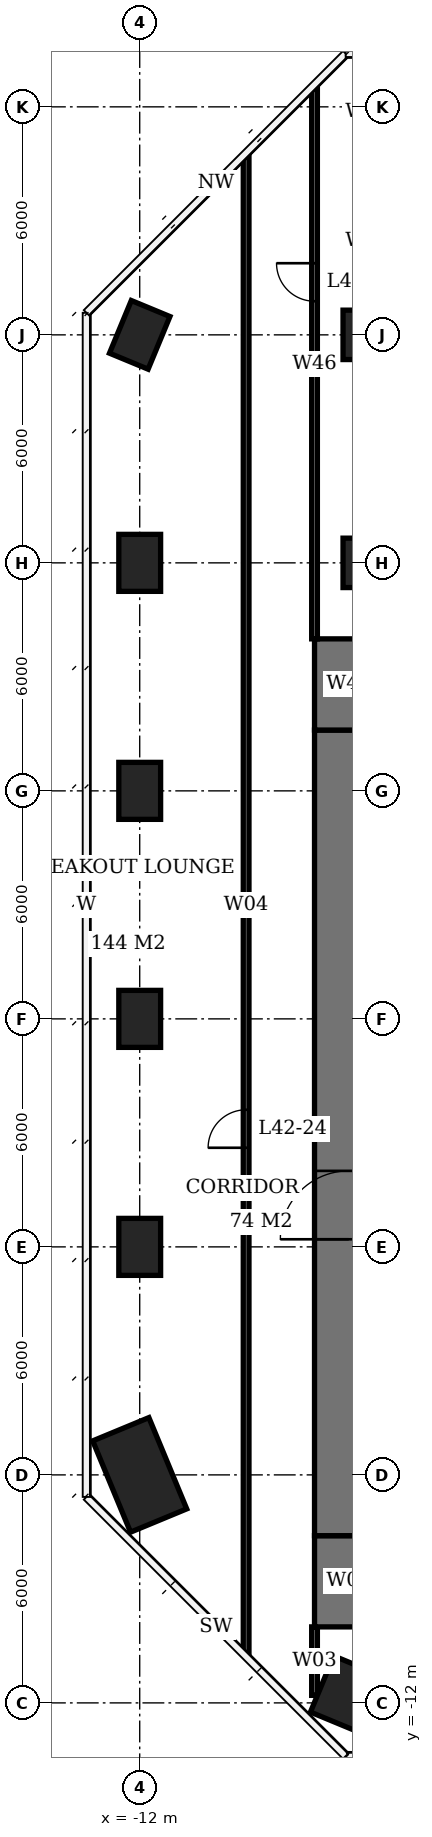
"""IFC4 building model, lengths in metres.
Left out: names, types, materials, properties, quantities, classifications, styles, units other than length and angle.
Written with IfcOpenShell. Run it as: python <this file> out.ifc"""

import sys

from ifc_helpers import new_model, si_unit, direction, frame, frame_2d, origin, origin_2d, place, context, subcontext, project, spatial, rectangle, extrude, element, fill, save


model = new_model("IFC4")
c1 = context("Model", 3, precision=1e-05, world=origin(), true_north=direction((0.0, 1.0)))
c2 = subcontext(c1, "Body", "Model", "MODEL_VIEW")
j1 = project(units=[si_unit("LENGTHUNIT", "METRE"), si_unit("PLANEANGLEUNIT", "RADIAN")], contexts=[c1])
p1 = place(None, origin())
s1 = spatial("IfcSite", under=j1, at=p1, CompositionType="ELEMENT")
p2 = place(p1, origin())
s2 = spatial("IfcBuilding", under=s1, at=p2, CompositionType="ELEMENT")
p3 = place(p2, frame((0.0, 0.0, 173.3)))
s3 = spatial("IfcBuildingStorey", under=s2, at=p3, CompositionType="ELEMENT", Elevation=173.3)
p4 = place(p3, frame((-12.0, -6.0, 0.0), z_axis=(0.0, 0.0, 1.0), x_axis=(-0.382683432365, 0.923879532511, 0.0)))
e1 = element("IfcColumn", 1, at=p4, inside=s3, PredefinedType="COLUMN", context=c2, shape_type="SweptSolid", body=[
    extrude(rectangle(XDim=2.6, YDim=1.6, at=origin_2d()), origin(), (0.0, 0.0, 1.0), 3.9),
])
for number, where, z_axis, x_axis in (
    (2, (-12.0, 0.0, 0.0), (0.0, 0.0, 1.0), (0.0, 1.0, 0.0)),
    (3, (-12.0, 6.0, 0.0), (0.0, 0.0, 1.0), (0.0, 1.0, 0.0)),
    (4, (-12.0, 12.0, 0.0), (0.0, 0.0, 1.0), (0.0, 1.0, 0.0)),
    (5, (-12.0, 18.0, 0.0), (0.0, 0.0, 1.0), (0.0, 1.0, 0.0)),
    (6, (-12.0, 24.0, 0.0), (0.0, 0.0, 1.0), (0.383, 0.924, 0.0)),
):
    element("IfcColumn", number, at=place(p3, frame(where, z_axis=z_axis, x_axis=x_axis)), inside=s3, PredefinedType="COLUMN", context=c2, shape_type="SweptSolid", body=[
        extrude(rectangle(XDim=1.5, YDim=1.1, at=origin_2d()), origin(), (0.0, 0.0, 1.0), 3.9),
    ])
p5 = place(p3, frame((-6.0, -12.0, 0.0), z_axis=(0.0, 0.0, 1.0), x_axis=(-0.923879532511, 0.382683432365, 0.0)))
e7 = element("IfcColumn", 7, at=p5, inside=s3, PredefinedType="COLUMN", context=c2, shape_type="SweptSolid", body=[
    extrude(rectangle(XDim=2.6, YDim=1.6, at=origin_2d()), origin(), (0.0, 0.0, 1.0), 3.9),
])
for number, where, z_axis, x_axis in (
    (8, (-6.0, 18.0, 0.0), (0.0, 0.0, 1.0), (1.0, 0.0, 0.0)),
    (9, (-6.0, 24.0, 0.0), (0.0, 0.0, 1.0), (1.0, 0.0, 0.0)),
):
    element("IfcColumn", number, at=place(p3, frame(where, z_axis=z_axis, x_axis=x_axis)), inside=s3, PredefinedType="COLUMN", context=c2, shape_type="SweptSolid", body=[
        extrude(rectangle(XDim=1.3, YDim=1.3, at=origin_2d()), origin(), (0.0, 0.0, 1.0), 3.9),
    ])
p6 = place(p3, frame((-6.5, -7.6, 0.0), z_axis=(0.0, 0.0, 1.0), x_axis=(0.0, 1.0, 0.0)))
e10 = element("IfcWall", 10, at=p6, inside=s3, PredefinedType="SHEAR", context=c2, shape_type="SweptSolid", body=[
    extrude(rectangle(XDim=21.2, YDim=1.8, at=frame_2d((10.6, 0.0))), origin(), (0.0, 0.0, 1.0), 3.9),
])
p7 = place(p6, frame((7.8, 0.0, 0.0)))
e11 = element("IfcOpeningElement", 11, at=p7, cuts=e10, PredefinedType="OPENING", context=c2, shape_type="SweptSolid", body=[
    extrude(rectangle(XDim=1.8, YDim=2.4, at=frame_2d((0.9, 1.2))), frame((0.0, 0.91, 0.0), z_axis=(0.0, -1.0, 0.0), x_axis=(1.0, 0.0, 0.0)), (0.0, 0.0, 1.0), 1.82),
])
for number, where, z_axis, x_axis in (
    (12, (-6.5, -10.0, 0.0), (0.0, 0.0, 1.0), (0.0, 1.0, 0.0)),
    (13, (-6.5, 13.6, 0.0), (0.0, 0.0, 1.0), (0.0, 1.0, 0.0)),
):
    element("IfcWall", number, at=place(p3, frame(where, z_axis=z_axis, x_axis=x_axis)), inside=s3, PredefinedType="SHEAR", context=c2, shape_type="SweptSolid", body=[
        extrude(rectangle(XDim=2.4, YDim=1.8, at=frame_2d((1.2, 0.0))), origin(), (0.0, 0.0, 1.0), 3.9),
    ])
p8 = place(p3, frame((-9.2, -10.689, 0.0), z_axis=(0.0, 0.0, 1.0), x_axis=(0.0, 1.0, 0.0)))
e14 = element("IfcWall", 14, at=p8, inside=s3, PredefinedType="PARTITIONING", context=c2, shape_type="SweptSolid", body=[
    extrude(rectangle(XDim=39.378, YDim=0.15, at=frame_2d((19.689, 0.0))), origin(), (0.0, 0.0, 1.0), 3.65),
])
p9 = place(p8, frame((13.297, 0.0, 0.0)))
e15 = element("IfcOpeningElement", 15, at=p9, cuts=e14, PredefinedType="OPENING", context=c2, shape_type="SweptSolid", body=[
    extrude(rectangle(XDim=1.0, YDim=2.1, at=frame_2d((0.5, 1.05))), frame((0.0, 0.085, 0.0), z_axis=(0.0, -1.0, 0.0), x_axis=(1.0, 0.0, 0.0)), (0.0, 0.0, 1.0), 0.17),
])
p10 = place(p3, frame((-7.4, -11.802, 0.0), z_axis=(0.0, 0.0, 1.0), x_axis=(0.0, 1.0, 0.0)))
e16 = element("IfcWall", 16, at=p10, inside=s3, PredefinedType="PARTITIONING", context=c2, shape_type="SweptSolid", body=[
    extrude(rectangle(XDim=1.802, YDim=0.15, at=frame_2d((0.901, 0.0))), origin(), (0.0, 0.0, 1.0), 3.65),
])
p11 = place(p3, frame((-7.4, 16.0, 0.0), z_axis=(0.0, 0.0, 1.0), x_axis=(0.0, 1.0, 0.0)))
e17 = element("IfcWall", 17, at=p11, inside=s3, PredefinedType="PARTITIONING", context=c2, shape_type="SweptSolid", body=[
    extrude(rectangle(XDim=14.489, YDim=0.15, at=frame_2d((7.245, 0.0))), origin(), (0.0, 0.0, 1.0), 3.65),
])
p12 = place(p11, frame((8.885, 0.0, 0.0)))
e18 = element("IfcOpeningElement", 18, at=p12, cuts=e17, PredefinedType="OPENING", context=c2, shape_type="SweptSolid", body=[
    extrude(rectangle(XDim=1.0, YDim=2.1, at=frame_2d((0.5, 1.05))), frame((0.0, 0.085, 0.0), z_axis=(0.0, -1.0, 0.0), x_axis=(1.0, 0.0, 0.0)), (0.0, 0.0, 1.0), 0.17),
])
p13 = place(p7, origin())
e19 = element("IfcDoor", 19, at=p13, inside=s3, OperationType="DOUBLE_DOOR_SINGLE_SWING", PredefinedType="DOOR", context=c2, shape_type="SweptSolid", body=[
    extrude(rectangle(XDim=1.8, YDim=2.4, at=frame_2d((0.9, 1.2))), frame((0.0, 0.025, 0.0), z_axis=(0.0, -1.0, 0.0), x_axis=(1.0, 0.0, 0.0)), (0.0, 0.0, 1.0), 0.05),
])
fill(e11, e19)
p14 = place(p9, origin())
e20 = element("IfcDoor", 20, at=p14, inside=s3, OperationType="SINGLE_SWING_LEFT", PredefinedType="DOOR", context=c2, shape_type="SweptSolid", body=[
    extrude(rectangle(XDim=1.0, YDim=2.1, at=frame_2d((0.5, 1.05))), frame((0.0, 0.025, 0.0), z_axis=(0.0, -1.0, 0.0), x_axis=(1.0, 0.0, 0.0)), (0.0, 0.0, 1.0), 0.05),
])
fill(e15, e20)
p15 = place(p12, origin())
e21 = element("IfcDoor", 21, at=p15, inside=s3, OperationType="SINGLE_SWING_RIGHT", PredefinedType="DOOR", context=c2, shape_type="SweptSolid", body=[
    extrude(rectangle(XDim=1.0, YDim=2.1, at=frame_2d((0.5, 1.05))), frame((0.0, 0.025, 0.0), z_axis=(0.0, -1.0, 0.0), x_axis=(1.0, 0.0, 0.0)), (0.0, 0.0, 1.0), 0.05),
])
fill(e18, e21)
save(model, sys.argv[1])
